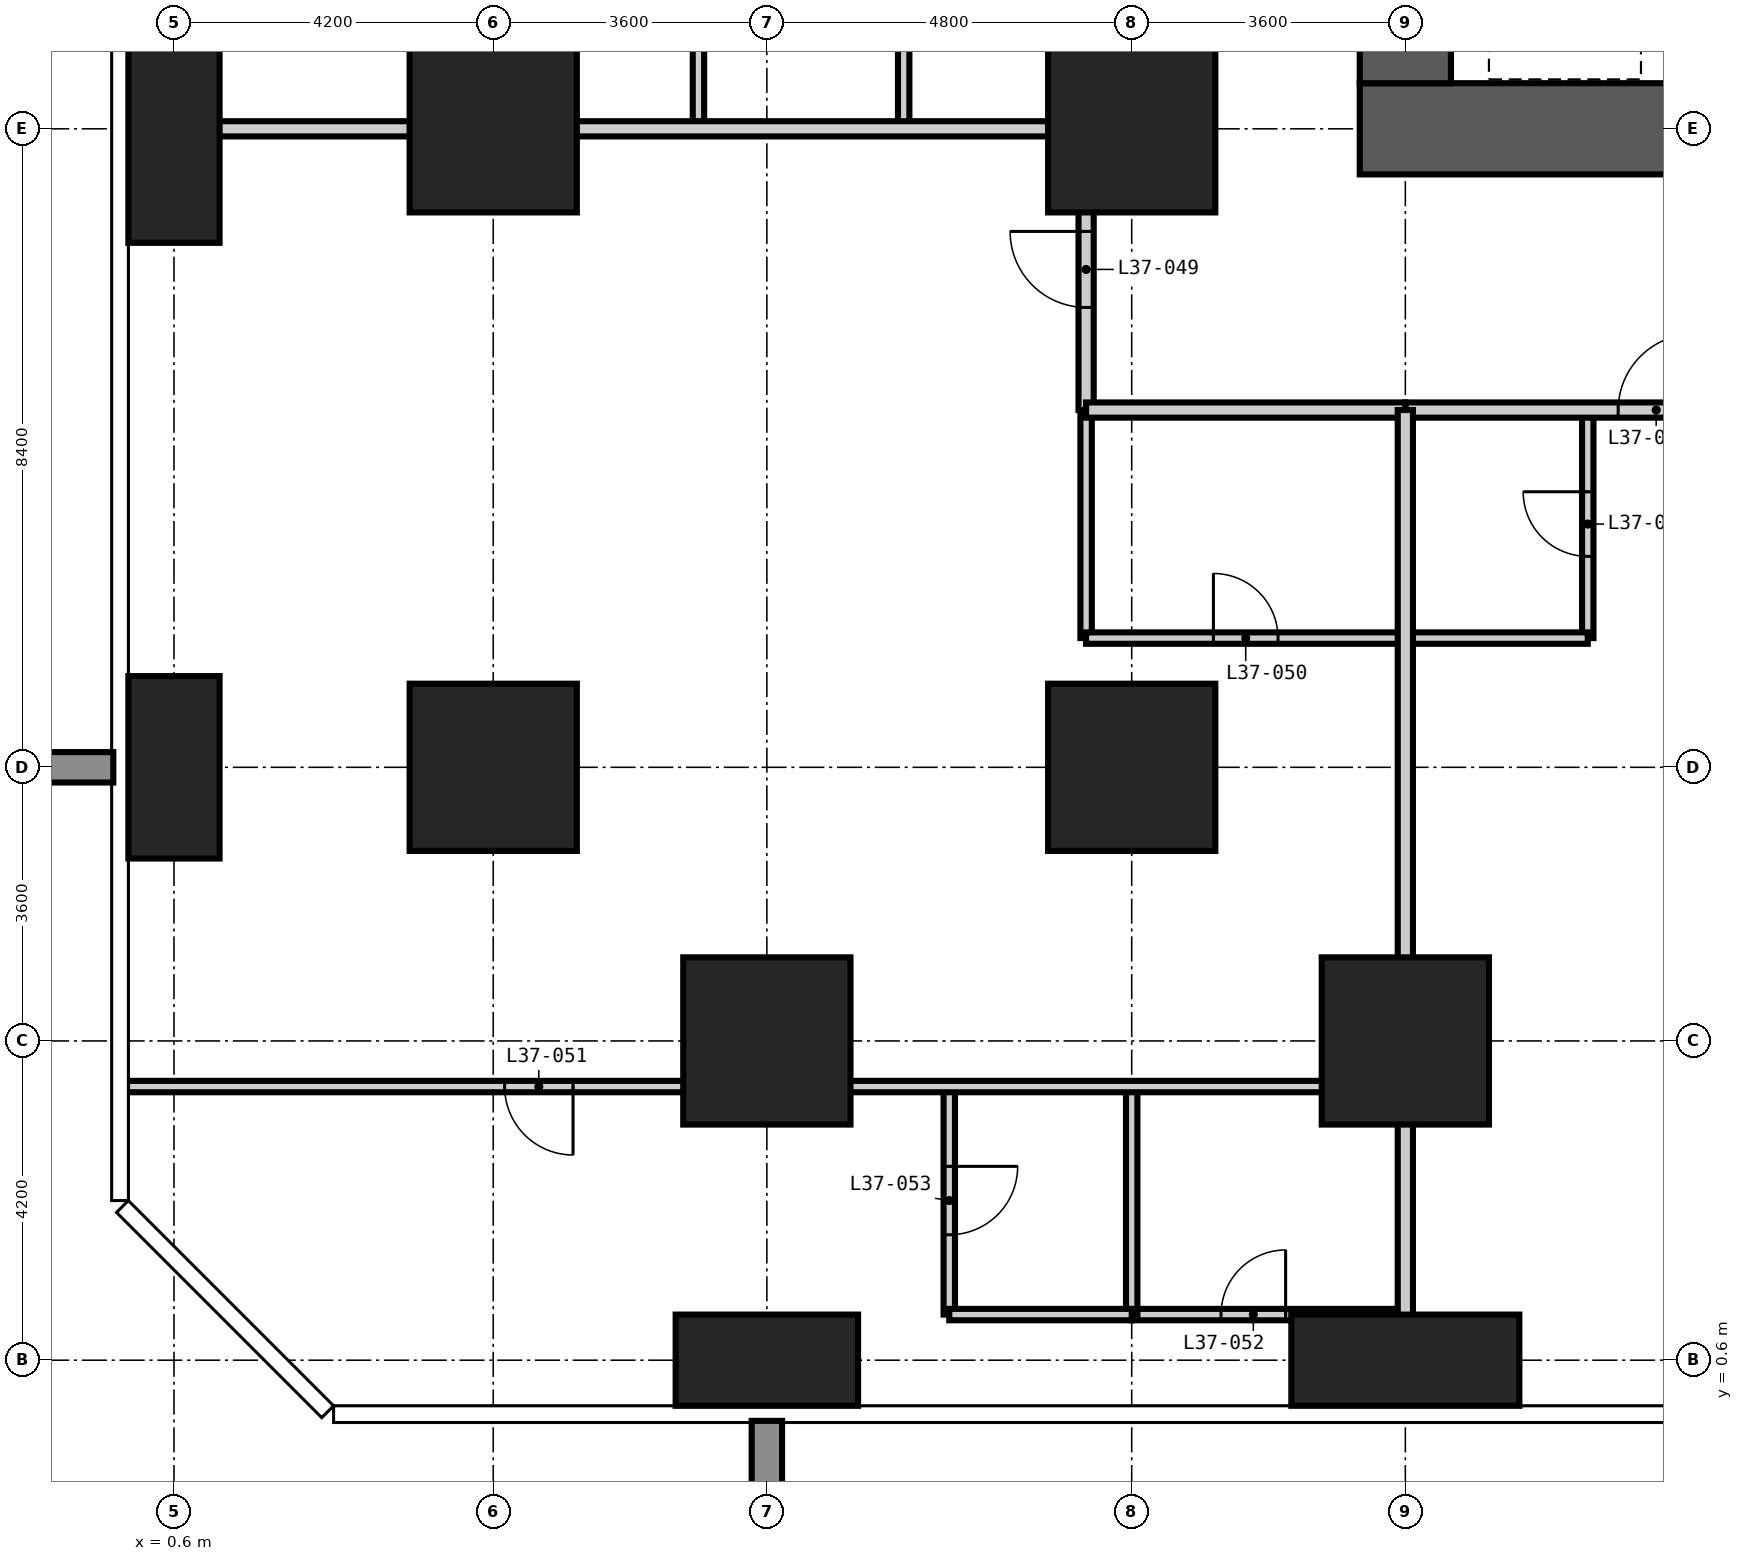
"""IFC4 building model, lengths in metres.
Left out: names, types, materials, properties, quantities, classifications, styles, units other than length and angle.
Written with IfcOpenShell. Run it as: python <this file> out.ifc"""

import sys

from ifc_helpers import new_model, si_unit, direction, frame, frame_2d, origin, origin_2d, place, context, subcontext, project, spatial, rectangle, extrude, element, fill, save


model = new_model("IFC4")
c1 = context("Model", 3, precision=1e-05, world=origin(), true_north=direction((0.0, 1.0)))
c2 = subcontext(c1, "Body", "Model", "MODEL_VIEW")
j1 = project(units=[si_unit("LENGTHUNIT", "METRE"), si_unit("PLANEANGLEUNIT", "RADIAN")], contexts=[c1])
p1 = place(None, origin())
s1 = spatial("IfcSite", under=j1, at=p1, CompositionType="ELEMENT")
p2 = place(p1, origin())
s2 = spatial("IfcBuilding", under=s1, at=p2, CompositionType="ELEMENT")
p3 = place(p2, frame((0.0, 0.0, 144.0)))
s3 = spatial("IfcBuildingStorey", under=s2, at=p3, CompositionType="ELEMENT", Elevation=144.0)
p4 = place(p3, frame((0.6, 8.4, -0.35), z_axis=(0.0, 0.0, 1.0), x_axis=(1.0, 0.0, 0.0)))
e1 = element("IfcColumn", 1, at=p4, inside=s3, PredefinedType="COLUMN", context=c2, shape_type="SweptSolid", body=[
    extrude(rectangle(XDim=1.2, YDim=2.4, at=origin_2d()), origin(), (0.0, 0.0, 1.0), 3.6),
])
p5 = place(p3, frame((0.6, 16.8, -0.35), z_axis=(0.0, 0.0, 1.0), x_axis=(1.0, 0.0, 0.0)))
e2 = element("IfcColumn", 2, at=p5, inside=s3, PredefinedType="COLUMN", context=c2, shape_type="SweptSolid", body=[
    extrude(rectangle(XDim=1.2, YDim=3.0, at=origin_2d()), origin(), (0.0, 0.0, 1.0), 3.6),
])
for number, where, z_axis, x_axis in (
    (3, (4.8, 8.4, -0.35), (0.0, 0.0, 1.0), (1.0, 0.0, 0.0)),
    (4, (4.8, 16.8, -0.35), (0.0, 0.0, 1.0), (1.0, 0.0, 0.0)),
):
    element("IfcColumn", number, at=place(p3, frame(where, z_axis=z_axis, x_axis=x_axis)), inside=s3, PredefinedType="COLUMN", context=c2, shape_type="SweptSolid", body=[
        extrude(rectangle(XDim=2.2, YDim=2.2, at=origin_2d()), origin(), (0.0, 0.0, 1.0), 3.6),
    ])
p6 = place(p3, frame((8.4, 0.6, -0.35), z_axis=(0.0, 0.0, 1.0), x_axis=(1.0, 0.0, 0.0)))
e5 = element("IfcColumn", 5, at=p6, inside=s3, PredefinedType="COLUMN", context=c2, shape_type="SweptSolid", body=[
    extrude(rectangle(XDim=2.4, YDim=1.2, at=origin_2d()), origin(), (0.0, 0.0, 1.0), 3.6),
])
for number, where, z_axis, x_axis in (
    (6, (8.4, 4.8, -0.35), (0.0, 0.0, 1.0), (1.0, 0.0, 0.0)),
    (7, (13.2, 8.4, -0.35), (0.0, 0.0, 1.0), (1.0, 0.0, 0.0)),
    (8, (13.2, 16.8, -0.35), (0.0, 0.0, 1.0), (1.0, 0.0, 0.0)),
):
    element("IfcColumn", number, at=place(p3, frame(where, z_axis=z_axis, x_axis=x_axis)), inside=s3, PredefinedType="COLUMN", context=c2, shape_type="SweptSolid", body=[
        extrude(rectangle(XDim=2.2, YDim=2.2, at=origin_2d()), origin(), (0.0, 0.0, 1.0), 3.6),
    ])
p7 = place(p3, frame((16.8, 0.6, -0.35), z_axis=(0.0, 0.0, 1.0), x_axis=(1.0, 0.0, 0.0)))
e9 = element("IfcColumn", 9, at=p7, inside=s3, PredefinedType="COLUMN", context=c2, shape_type="SweptSolid", body=[
    extrude(rectangle(XDim=3.0, YDim=1.2, at=origin_2d()), origin(), (0.0, 0.0, 1.0), 3.6),
])
p8 = place(p3, frame((16.8, 4.8, -0.35), z_axis=(0.0, 0.0, 1.0), x_axis=(1.0, 0.0, 0.0)))
e10 = element("IfcColumn", 10, at=p8, inside=s3, PredefinedType="COLUMN", context=c2, shape_type="SweptSolid", body=[
    extrude(rectangle(XDim=2.2, YDim=2.2, at=origin_2d()), origin(), (0.0, 0.0, 1.0), 3.6),
])
p9 = place(p3, frame((16.2, 16.8, -0.35), z_axis=(0.0, 0.0, 1.0), x_axis=(1.0, 0.0, 0.0)))
e11 = element("IfcWall", 11, at=p9, inside=s3, PredefinedType="SHEAR", context=c2, shape_type="SweptSolid", body=[
    extrude(rectangle(XDim=26.4, YDim=1.2, at=frame_2d((13.2, 0.0))), origin(), (0.0, 0.0, 1.0), 3.6),
])
p10 = place(p9, frame((12.7, 0.0, 0.35)))
e12 = element("IfcOpeningElement", 12, at=p10, cuts=e11, PredefinedType="OPENING", context=c2, shape_type="SweptSolid", body=[
    extrude(rectangle(XDim=1.0, YDim=2.1, at=frame_2d((0.5, 1.05))), frame((0.0, 0.61, 0.0), z_axis=(0.0, -1.0, 0.0), x_axis=(1.0, 0.0, 0.0)), (0.0, 0.0, 1.0), 1.22),
])
p11 = place(p9, frame((19.0, 0.0, 0.35)))
e13 = element("IfcOpeningElement", 13, at=p11, cuts=e11, PredefinedType="OPENING", context=c2, shape_type="SweptSolid", body=[
    extrude(rectangle(XDim=1.0, YDim=2.1, at=frame_2d((0.5, 1.05))), frame((0.0, 0.61, 0.0), z_axis=(0.0, -1.0, 0.0), x_axis=(1.0, 0.0, 0.0)), (0.0, 0.0, 1.0), 1.22),
])
p12 = place(p3, frame((16.8, 41.4, -0.35), z_axis=(0.0, 0.0, 1.0), x_axis=(0.0, -1.0, 0.0)))
e14 = element("IfcWall", 14, at=p12, inside=s3, PredefinedType="SHEAR", context=c2, shape_type="SweptSolid", body=[
    extrude(rectangle(XDim=24.0, YDim=1.2, at=frame_2d((12.0, 0.0))), origin(), (0.0, 0.0, 1.0), 3.6),
])
p13 = place(p12, frame((11.1, 0.0, 0.35)))
e15 = element("IfcOpeningElement", 15, at=p13, cuts=e14, PredefinedType="OPENING", context=c2, shape_type="SweptSolid", body=[
    extrude(rectangle(XDim=1.8, YDim=2.2, at=frame_2d((0.9, 1.1))), frame((0.0, 0.61, 0.0), z_axis=(0.0, -1.0, 0.0), x_axis=(1.0, 0.0, 0.0)), (0.0, 0.0, 1.0), 1.22),
])
p14 = place(p12, frame((19.9, 0.0, 0.35)))
e16 = element("IfcOpeningElement", 16, at=p14, cuts=e14, PredefinedType="OPENING", context=c2, shape_type="SweptSolid", body=[
    extrude(rectangle(XDim=1.0, YDim=2.1, at=frame_2d((0.5, 1.05))), frame((0.0, 0.61, 0.0), z_axis=(0.0, -1.0, 0.0), x_axis=(1.0, 0.0, 0.0)), (0.0, 0.0, 1.0), 1.22),
])
p15 = place(p12, frame((5.2, 0.0, 0.35)))
e17 = element("IfcOpeningElement", 17, at=p15, cuts=e14, PredefinedType="OPENING", context=c2, shape_type="SweptSolid", body=[
    extrude(rectangle(XDim=1.0, YDim=2.1, at=frame_2d((0.5, 1.05))), frame((0.0, 0.61, 0.0), z_axis=(0.0, -1.0, 0.0), x_axis=(1.0, 0.0, 0.0)), (0.0, 0.0, 1.0), 1.22),
])
p16 = place(p3, frame((7.5, 16.8, 0.0), z_axis=(0.0, 0.0, 1.0), x_axis=(0.0, 1.0, 0.0)))
e18 = element("IfcWall", 18, at=p16, inside=s3, PredefinedType="PARTITIONING", context=c2, shape_type="SweptSolid", body=[
    extrude(rectangle(XDim=3.0, YDim=0.15, at=frame_2d((1.5, 0.0))), origin(), (0.0, 0.0, 1.0), 3.25),
])
p17 = place(p3, frame((10.2, 16.8, 0.0), z_axis=(0.0, 0.0, 1.0), x_axis=(0.0, 1.0, 0.0)))
e19 = element("IfcWall", 19, at=p17, inside=s3, PredefinedType="PARTITIONING", context=c2, shape_type="SweptSolid", body=[
    extrude(rectangle(XDim=3.0, YDim=0.15, at=frame_2d((1.5, 0.0))), origin(), (0.0, 0.0, 1.0), 3.25),
])
p18 = place(p17, frame((1.075, 0.0, 0.0)))
e20 = element("IfcOpeningElement", 20, at=p18, cuts=e19, PredefinedType="OPENING", context=c2, shape_type="SweptSolid", body=[
    extrude(rectangle(XDim=0.85, YDim=2.1, at=frame_2d((0.425, 1.05))), frame((0.0, 0.085, 0.0), z_axis=(0.0, -1.0, 0.0), x_axis=(1.0, 0.0, 0.0)), (0.0, 0.0, 1.0), 0.17),
])
p19 = place(p3, frame((12.6, 10.1, 0.0), z_axis=(0.0, 0.0, 1.0), x_axis=(0.0, 1.0, 0.0)))
e21 = element("IfcWall", 21, at=p19, inside=s3, PredefinedType="PARTITIONING", context=c2, shape_type="SweptSolid", body=[
    extrude(rectangle(XDim=3.0, YDim=0.15, at=frame_2d((1.5, 0.0))), origin(), (0.0, 0.0, 1.0), 3.25),
])
p20 = place(p3, frame((19.2, 10.1, 0.0), z_axis=(0.0, 0.0, 1.0), x_axis=(0.0, 1.0, 0.0)))
e22 = element("IfcWall", 22, at=p20, inside=s3, PredefinedType="PARTITIONING", context=c2, shape_type="SweptSolid", body=[
    extrude(rectangle(XDim=3.0, YDim=0.15, at=frame_2d((1.5, 0.0))), origin(), (0.0, 0.0, 1.0), 3.25),
])
p21 = place(p20, frame((1.075, 0.0, 0.0)))
e23 = element("IfcOpeningElement", 23, at=p21, cuts=e22, PredefinedType="OPENING", context=c2, shape_type="SweptSolid", body=[
    extrude(rectangle(XDim=0.85, YDim=2.1, at=frame_2d((0.425, 1.05))), frame((0.0, 0.085, 0.0), z_axis=(0.0, -1.0, 0.0), x_axis=(1.0, 0.0, 0.0)), (0.0, 0.0, 1.0), 0.17),
])
p22 = place(p3, frame((13.2, 1.2, 0.0), z_axis=(0.0, 0.0, 1.0), x_axis=(1.0, 0.0, 0.0)))
e24 = element("IfcWall", 24, at=p22, inside=s3, PredefinedType="PARTITIONING", context=c2, shape_type="SweptSolid", body=[
    extrude(rectangle(XDim=3.6, YDim=0.15, at=frame_2d((1.8, 0.0))), origin(), (0.0, 0.0, 1.0), 3.25),
])
p23 = place(p22, frame((1.175, 0.0, 0.0)))
e25 = element("IfcOpeningElement", 25, at=p23, cuts=e24, PredefinedType="OPENING", context=c2, shape_type="SweptSolid", body=[
    extrude(rectangle(XDim=0.85, YDim=2.1, at=frame_2d((0.425, 1.05))), frame((0.0, 0.085, 0.0), z_axis=(0.0, -1.0, 0.0), x_axis=(1.0, 0.0, 0.0)), (0.0, 0.0, 1.0), 0.17),
])
p24 = place(p3, frame((12.6, 10.1, 0.0), z_axis=(0.0, 0.0, 1.0), x_axis=(1.0, 0.0, 0.0)))
e26 = element("IfcWall", 26, at=p24, inside=s3, PredefinedType="PARTITIONING", context=c2, shape_type="SweptSolid", body=[
    extrude(rectangle(XDim=6.6, YDim=0.15, at=frame_2d((3.3, 0.0))), origin(), (0.0, 0.0, 1.0), 3.25),
])
p25 = place(p24, frame((1.675, 0.0, 0.0)))
e27 = element("IfcOpeningElement", 27, at=p25, cuts=e26, PredefinedType="OPENING", context=c2, shape_type="SweptSolid", body=[
    extrude(rectangle(XDim=0.85, YDim=2.1, at=frame_2d((0.425, 1.05))), frame((0.0, 0.085, 0.0), z_axis=(0.0, -1.0, 0.0), x_axis=(1.0, 0.0, 0.0)), (0.0, 0.0, 1.0), 0.17),
])
p26 = place(p3, frame((12.6, 13.1, 0.0), z_axis=(0.0, 0.0, 1.0), x_axis=(0.0, 1.0, 0.0)))
e28 = element("IfcWall", 28, at=p26, inside=s3, PredefinedType="PARTITIONING", context=c2, shape_type="SweptSolid", body=[
    extrude(rectangle(XDim=31.4, YDim=0.2, at=frame_2d((15.7, 0.0))), origin(), (0.0, 0.0, 1.0), 3.25),
])
p27 = place(p26, frame((5.3, 0.0, 0.0)))
e29 = element("IfcOpeningElement", 29, at=p27, cuts=e28, PredefinedType="OPENING", context=c2, shape_type="SweptSolid", body=[
    extrude(rectangle(XDim=1.0, YDim=2.2, at=frame_2d((0.5, 1.1))), frame((0.0, 0.11, 0.0), z_axis=(0.0, -1.0, 0.0), x_axis=(1.0, 0.0, 0.0)), (0.0, 0.0, 1.0), 0.22),
])
p28 = place(p26, frame((13.3, 0.0, 0.0)))
e30 = element("IfcOpeningElement", 30, at=p28, cuts=e28, PredefinedType="OPENING", context=c2, shape_type="SweptSolid", body=[
    extrude(rectangle(XDim=1.0, YDim=2.2, at=frame_2d((0.5, 1.1))), frame((0.0, 0.11, 0.0), z_axis=(0.0, -1.0, 0.0), x_axis=(1.0, 0.0, 0.0)), (0.0, 0.0, 1.0), 0.22),
])
p29 = place(p26, frame((18.3, 0.0, 0.0)))
e31 = element("IfcOpeningElement", 31, at=p29, cuts=e28, PredefinedType="OPENING", context=c2, shape_type="SweptSolid", body=[
    extrude(rectangle(XDim=1.0, YDim=2.2, at=frame_2d((0.5, 1.1))), frame((0.0, 0.11, 0.0), z_axis=(0.0, -1.0, 0.0), x_axis=(1.0, 0.0, 0.0)), (0.0, 0.0, 1.0), 0.22),
])
p30 = place(p26, frame((26.3, 0.0, 0.0)))
e32 = element("IfcOpeningElement", 32, at=p30, cuts=e28, PredefinedType="OPENING", context=c2, shape_type="SweptSolid", body=[
    extrude(rectangle(XDim=1.0, YDim=2.2, at=frame_2d((0.5, 1.1))), frame((0.0, 0.11, 0.0), z_axis=(0.0, -1.0, 0.0), x_axis=(1.0, 0.0, 0.0)), (0.0, 0.0, 1.0), 0.22),
])
p31 = place(p26, frame((1.35, 0.0, 0.0)))
e33 = element("IfcOpeningElement", 33, at=p31, cuts=e28, PredefinedType="OPENING", context=c2, shape_type="SweptSolid", body=[
    extrude(rectangle(XDim=1.0, YDim=2.2, at=frame_2d((0.5, 1.1))), frame((0.0, 0.11, 0.0), z_axis=(0.0, -1.0, 0.0), x_axis=(1.0, 0.0, 0.0)), (0.0, 0.0, 1.0), 0.22),
])
p32 = place(p26, frame((30.05, 0.0, 0.0)))
e34 = element("IfcOpeningElement", 34, at=p32, cuts=e28, PredefinedType="OPENING", context=c2, shape_type="SweptSolid", body=[
    extrude(rectangle(XDim=1.0, YDim=2.2, at=frame_2d((0.5, 1.1))), frame((0.0, 0.11, 0.0), z_axis=(0.0, -1.0, 0.0), x_axis=(1.0, 0.0, 0.0)), (0.0, 0.0, 1.0), 0.22),
])
p33 = place(p3, frame((16.8, 13.1, 0.0), z_axis=(0.0, 0.0, 1.0), x_axis=(1.0, 0.0, 0.0)))
e35 = element("IfcWall", 35, at=p33, inside=s3, PredefinedType="PARTITIONING", context=c2, shape_type="SweptSolid", body=[
    extrude(rectangle(XDim=4.2, YDim=0.2, at=frame_2d((2.1, 0.0))), origin(), (0.0, 0.0, 1.0), 3.25),
])
p34 = place(p33, frame((2.8, 0.0, 0.0)))
e36 = element("IfcOpeningElement", 36, at=p34, cuts=e35, PredefinedType="OPENING", context=c2, shape_type="SweptSolid", body=[
    extrude(rectangle(XDim=1.0, YDim=2.2, at=frame_2d((0.5, 1.1))), frame((0.0, 0.11, 0.0), z_axis=(0.0, -1.0, 0.0), x_axis=(1.0, 0.0, 0.0)), (0.0, 0.0, 1.0), 0.22),
])
p35 = place(p3, frame((16.8, 13.1, 0.0), z_axis=(0.0, 0.0, 1.0), x_axis=(-1.0, 0.0, 0.0)))
e37 = element("IfcWall", 37, at=p35, inside=s3, PredefinedType="PARTITIONING", context=c2, shape_type="SweptSolid", body=[
    extrude(rectangle(XDim=4.2, YDim=0.2, at=frame_2d((2.1, 0.0))), origin(), (0.0, 0.0, 1.0), 3.25),
])
p36 = place(p3, frame((16.8, -0.018, 0.0), z_axis=(0.0, 0.0, 1.0), x_axis=(0.0, 1.0, 0.0)))
e38 = element("IfcWall", 38, at=p36, inside=s3, PredefinedType="PARTITIONING", context=c2, shape_type="SweptSolid", body=[
    extrude(rectangle(XDim=13.118, YDim=0.2, at=frame_2d((6.559, 0.0))), origin(), (0.0, 0.0, 1.0), 3.25),
])
p37 = place(p3, frame((-0.018, 16.8, 0.0), z_axis=(0.0, 0.0, 1.0), x_axis=(1.0, 0.0, 0.0)))
e39 = element("IfcWall", 39, at=p37, inside=s3, PredefinedType="PARTITIONING", context=c2, shape_type="SweptSolid", body=[
    extrude(rectangle(XDim=12.618, YDim=0.2, at=frame_2d((6.309, 0.0))), origin(), (0.0, 0.0, 1.0), 3.25),
])
p38 = place(p3, frame((10.8, 1.2, 0.0), z_axis=(0.0, 0.0, 1.0), x_axis=(0.0, 1.0, 0.0)))
e40 = element("IfcWall", 40, at=p38, inside=s3, PredefinedType="PARTITIONING", context=c2, shape_type="SweptSolid", body=[
    extrude(rectangle(XDim=3.0, YDim=0.15, at=frame_2d((1.5, 0.0))), origin(), (0.0, 0.0, 1.0), 3.25),
])
p39 = place(p38, frame((1.05, 0.0, 0.0)))
e41 = element("IfcOpeningElement", 41, at=p39, cuts=e40, PredefinedType="OPENING", context=c2, shape_type="SweptSolid", body=[
    extrude(rectangle(XDim=0.9, YDim=2.1, at=frame_2d((0.45, 1.05))), frame((0.0, 0.085, 0.0), z_axis=(0.0, -1.0, 0.0), x_axis=(1.0, 0.0, 0.0)), (0.0, 0.0, 1.0), 0.17),
])
p40 = place(p3, frame((13.2, 1.2, 0.0), z_axis=(0.0, 0.0, 1.0), x_axis=(0.0, 1.0, 0.0)))
e42 = element("IfcWall", 42, at=p40, inside=s3, PredefinedType="PARTITIONING", context=c2, shape_type="SweptSolid", body=[
    extrude(rectangle(XDim=3.0, YDim=0.15, at=frame_2d((1.5, 0.0))), origin(), (0.0, 0.0, 1.0), 3.25),
])
p41 = place(p3, frame((10.8, 1.2, 0.0), z_axis=(0.0, 0.0, 1.0), x_axis=(1.0, 0.0, 0.0)))
e43 = element("IfcWall", 43, at=p41, inside=s3, PredefinedType="PARTITIONING", context=c2, shape_type="SweptSolid", body=[
    extrude(rectangle(XDim=2.4, YDim=0.15, at=frame_2d((1.2, 0.0))), origin(), (0.0, 0.0, 1.0), 3.25),
])
p42 = place(p3, frame((-0.018, 4.2, 0.0), z_axis=(0.0, 0.0, 1.0), x_axis=(1.0, 0.0, 0.0)))
e44 = element("IfcWall", 44, at=p42, inside=s3, PredefinedType="PARTITIONING", context=c2, shape_type="SweptSolid", body=[
    extrude(rectangle(XDim=16.818, YDim=0.15, at=frame_2d((8.409, 0.0))), origin(), (0.0, 0.0, 1.0), 3.25),
])
p43 = place(p42, frame((4.968, 0.0, 0.0)))
e45 = element("IfcOpeningElement", 45, at=p43, cuts=e44, PredefinedType="OPENING", context=c2, shape_type="SweptSolid", body=[
    extrude(rectangle(XDim=0.9, YDim=2.1, at=frame_2d((0.45, 1.05))), frame((0.0, 0.085, 0.0), z_axis=(0.0, -1.0, 0.0), x_axis=(1.0, 0.0, 0.0)), (0.0, 0.0, 1.0), 0.17),
])
p44 = place(p34, origin())
e46 = element("IfcDoor", 46, at=p44, inside=s3, OperationType="SINGLE_SWING_RIGHT", PredefinedType="DOOR", context=c2, shape_type="SweptSolid", body=[
    extrude(rectangle(XDim=1.0, YDim=2.2, at=frame_2d((0.5, 1.1))), frame((0.0, 0.025, 0.0), z_axis=(0.0, -1.0, 0.0), x_axis=(1.0, 0.0, 0.0)), (0.0, 0.0, 1.0), 0.05),
])
fill(e36, e46)
p45 = place(p21, origin())
e47 = element("IfcDoor", 47, at=p45, inside=s3, OperationType="SINGLE_SWING_RIGHT", PredefinedType="DOOR", context=c2, shape_type="SweptSolid", body=[
    extrude(rectangle(XDim=0.85, YDim=2.1, at=frame_2d((0.425, 1.05))), frame((0.0, 0.025, 0.0), z_axis=(0.0, -1.0, 0.0), x_axis=(1.0, 0.0, 0.0)), (0.0, 0.0, 1.0), 0.05),
])
fill(e23, e47)
p46 = place(p31, origin())
e48 = element("IfcDoor", 48, at=p46, inside=s3, OperationType="SINGLE_SWING_RIGHT", PredefinedType="DOOR", context=c2, shape_type="SweptSolid", body=[
    extrude(rectangle(XDim=1.0, YDim=2.2, at=frame_2d((0.5, 1.1))), frame((0.0, 0.025, 0.0), z_axis=(0.0, -1.0, 0.0), x_axis=(1.0, 0.0, 0.0)), (0.0, 0.0, 1.0), 0.05),
])
fill(e33, e48)
p47 = place(p25, origin())
e49 = element("IfcDoor", 49, at=p47, inside=s3, OperationType="SINGLE_SWING_LEFT", PredefinedType="DOOR", context=c2, shape_type="SweptSolid", body=[
    extrude(rectangle(XDim=0.85, YDim=2.1, at=frame_2d((0.425, 1.05))), frame((0.0, 0.025, 0.0), z_axis=(0.0, -1.0, 0.0), x_axis=(1.0, 0.0, 0.0)), (0.0, 0.0, 1.0), 0.05),
])
fill(e27, e49)
p48 = place(p43, frame((0.9, 0.0, 0.0), z_axis=(0.0, 0.0, 1.0), x_axis=(-1.0, 0.0, 0.0)))
e50 = element("IfcDoor", 50, at=p48, inside=s3, OperationType="SINGLE_SWING_LEFT", PredefinedType="DOOR", context=c2, shape_type="SweptSolid", body=[
    extrude(rectangle(XDim=0.9, YDim=2.1, at=frame_2d((0.45, 1.05))), frame((0.0, 0.025, 0.0), z_axis=(0.0, -1.0, 0.0), x_axis=(1.0, 0.0, 0.0)), (0.0, 0.0, 1.0), 0.05),
])
fill(e45, e50)
p49 = place(p23, origin())
e51 = element("IfcDoor", 51, at=p49, inside=s3, OperationType="SINGLE_SWING_RIGHT", PredefinedType="DOOR", context=c2, shape_type="SweptSolid", body=[
    extrude(rectangle(XDim=0.85, YDim=2.1, at=frame_2d((0.425, 1.05))), frame((0.0, 0.025, 0.0), z_axis=(0.0, -1.0, 0.0), x_axis=(1.0, 0.0, 0.0)), (0.0, 0.0, 1.0), 0.05),
])
fill(e25, e51)
p50 = place(p39, frame((0.9, 0.0, 0.0), z_axis=(0.0, 0.0, 1.0), x_axis=(-1.0, 0.0, 0.0)))
e52 = element("IfcDoor", 52, at=p50, inside=s3, OperationType="SINGLE_SWING_LEFT", PredefinedType="DOOR", context=c2, shape_type="SweptSolid", body=[
    extrude(rectangle(XDim=0.9, YDim=2.1, at=frame_2d((0.45, 1.05))), frame((0.0, 0.025, 0.0), z_axis=(0.0, -1.0, 0.0), x_axis=(1.0, 0.0, 0.0)), (0.0, 0.0, 1.0), 0.05),
])
fill(e41, e52)
save(model, sys.argv[1])
